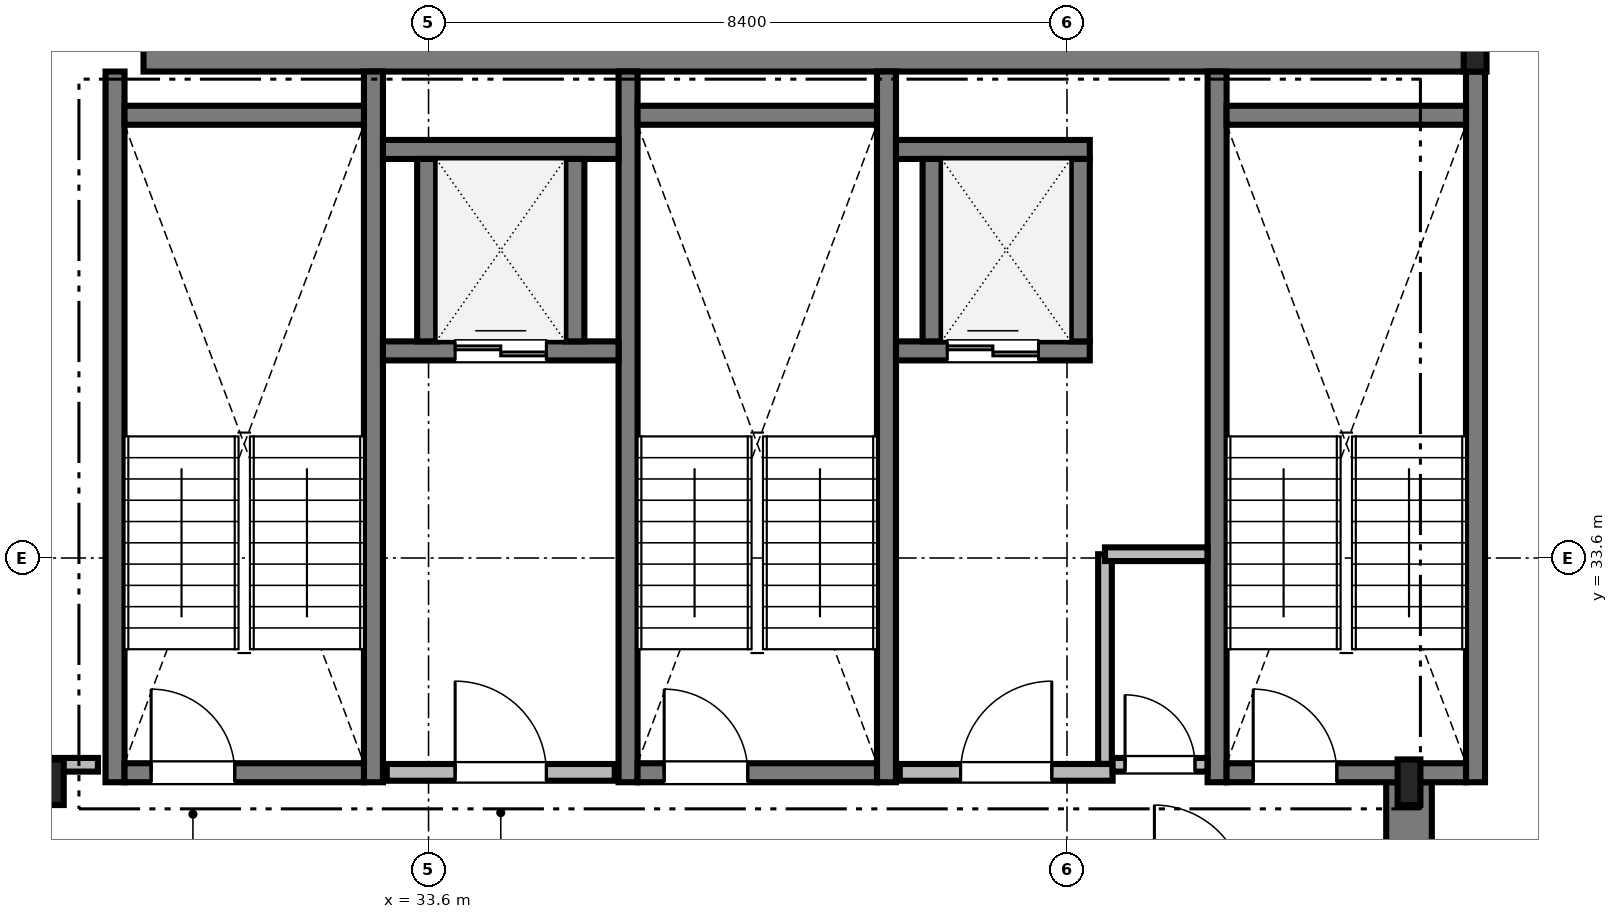
"""IFC4 building model, lengths in metres.
Left out: names, types, materials, properties, quantities, classifications, styles, units other than length and angle.
Written with IfcOpenShell. Run it as: python <this file> out.ifc"""

import sys

from ifc_helpers import new_model, si_unit, direction, frame, frame_2d, origin, origin_2d, place, context, subcontext, project, spatial, rectangle, i_section, extrude, source, transform, mapped, element, fill, save


model = new_model("IFC4")
c1 = context("Model", 3, precision=1e-05, world=origin(), true_north=direction((0.0, 1.0)))
c2 = subcontext(c1, "Body", "Model", "MODEL_VIEW")
j1 = project(units=[si_unit("LENGTHUNIT", "METRE"), si_unit("PLANEANGLEUNIT", "RADIAN")], contexts=[c1])
p1 = place(None, origin())
s1 = spatial("IfcSite", under=j1, at=p1, CompositionType="ELEMENT")
p2 = place(p1, origin())
s2 = spatial("IfcBuilding", under=s1, at=p2, CompositionType="ELEMENT")
p3 = place(p2, frame((0.0, 0.0, 258.5)))
s3 = spatial("IfcBuildingStorey", under=s2, at=p3, CompositionType="ELEMENT", Elevation=258.5)
m1 = source(origin(), c2, "Body", "SweptSolid", [
    extrude(rectangle(XDim=17.52, YDim=0.6, at=frame_2d((8.76, 0.0))), origin(), (0.0, 0.0, 1.0), 3.65),
])
p4 = place(p3, frame((29.85, 40.3, 0.0), z_axis=(0.0, 0.0, 1.0), x_axis=(1.0, 0.0, 0.0)))
e1 = element("IfcWall", 1, at=p4, inside=s3, PredefinedType="SHEAR", context=c2, shape_type="MappedRepresentation", body=[
    mapped(m1, transform((0.0, 0.0, 0.0), scale=1.0)),
])
m2 = source(origin(), c2, "Body", "SweptSolid", [
    extrude(rectangle(XDim=13.15, YDim=0.6, at=frame_2d((6.575, 0.0))), origin(), (0.0, 0.0, 1.0), 3.65),
])
p5 = place(p3, frame((46.5, 17.5, 0.0), z_axis=(0.0, 0.0, 1.0), x_axis=(0.0, 1.0, 0.0)))
e2 = element("IfcWall", 2, at=p5, inside=s3, PredefinedType="SHEAR", context=c2, shape_type="MappedRepresentation", body=[
    mapped(m2, transform((0.0, 0.0, 0.0), scale=1.0)),
])
m3 = source(origin(), c2, "Body", "SweptSolid", [
    extrude(i_section(OverallWidth=0.3, OverallDepth=0.6, WebThickness=0.015, FlangeThickness=0.03, FilletRadius=0.027, at=origin_2d()), origin(), (0.0, 0.0, 1.0), 3.65),
])
for number, where, z_axis, x_axis in (
    (3, (28.65, 30.65, 0.0), (0.0, 0.0, 1.0), (1.0, 0.0, 0.0)),
    (4, (46.5, 30.65, 0.0), (0.0, 0.0, 1.0), (1.0, 0.0, 0.0)),
    (5, (47.37, 40.3, 0.0), (0.0, 0.0, 1.0), (1.0, 0.0, 0.0)),
):
    element("IfcColumn", number, at=place(p3, frame(where, z_axis=z_axis, x_axis=x_axis)), inside=s3, PredefinedType="COLUMN", context=c2, shape_type="MappedRepresentation", body=[
        mapped(m3, transform((0.0, 0.0, 0.0), scale=1.0)),
    ])
m4 = source(origin(), c2, "Body", "SweptSolid", [
    extrude(rectangle(XDim=9.35, YDim=0.25, at=frame_2d((4.675, 0.0))), origin(), (0.0, 0.0, 1.0), 3.75),
])
for number, where, z_axis, x_axis in (
    (6, (29.475, 30.65, 0.0), (0.0, 0.0, 1.0), (0.0, 1.0, 0.0)),
    (7, (32.875, 30.65, 0.0), (0.0, 0.0, 1.0), (0.0, 1.0, 0.0)),
):
    element("IfcWall", number, at=place(p3, frame(where, z_axis=z_axis, x_axis=x_axis)), inside=s3, PredefinedType="SOLIDWALL", context=c2, shape_type="MappedRepresentation", body=[
        mapped(m4, transform((0.0, 0.0, 0.0), scale=1.0)),
    ])
m5 = source(origin(), c2, "Body", "SweptSolid", [
    extrude(rectangle(XDim=3.15, YDim=0.25, at=frame_2d((1.575, 0.0))), origin(), (0.0, 0.0, 1.0), 3.75),
])
p6 = place(p3, frame((29.6, 39.425, 0.0), z_axis=(0.0, 0.0, 1.0), x_axis=(1.0, 0.0, 0.0)))
e8 = element("IfcWall", 8, at=p6, inside=s3, PredefinedType="SOLIDWALL", context=c2, shape_type="MappedRepresentation", body=[
    mapped(m5, transform((0.0, 0.0, 0.0), scale=1.0)),
])
p7 = place(p3, frame((29.6, 30.775, 0.0), z_axis=(0.0, 0.0, 1.0), x_axis=(1.0, 0.0, 0.0)))
e9 = element("IfcWall", 9, at=p7, inside=s3, PredefinedType="SOLIDWALL", context=c2, shape_type="MappedRepresentation", body=[
    mapped(m5, transform((0.0, 0.0, 0.0), scale=1.0)),
])
m6 = source(origin(), c2, "Body", "SweptSolid", [
    extrude(rectangle(XDim=1.1, YDim=2.2, at=frame_2d((0.55, 1.1))), frame((0.0, 0.135, 0.0), z_axis=(0.0, -1.0, 0.0), x_axis=(1.0, 0.0, 0.0)), (0.0, 0.0, 1.0), 0.27),
])
p8 = place(p7, frame((0.35, 0.0, 0.0)))
e10 = element("IfcOpeningElement", 10, at=p8, cuts=e9, PredefinedType="OPENING", context=c2, shape_type="MappedRepresentation", body=[
    mapped(m6, transform((0.0, 0.0, 0.0), scale=1.0)),
])
for number, where, z_axis, x_axis in (
    (11, (36.225, 30.65, 0.0), (0.0, 0.0, 1.0), (0.0, 1.0, 0.0)),
    (12, (39.625, 30.65, 0.0), (0.0, 0.0, 1.0), (0.0, 1.0, 0.0)),
):
    element("IfcWall", number, at=place(p3, frame(where, z_axis=z_axis, x_axis=x_axis)), inside=s3, PredefinedType="SOLIDWALL", context=c2, shape_type="MappedRepresentation", body=[
        mapped(m4, transform((0.0, 0.0, 0.0), scale=1.0)),
    ])
p9 = place(p3, frame((36.35, 39.425, 0.0), z_axis=(0.0, 0.0, 1.0), x_axis=(1.0, 0.0, 0.0)))
e13 = element("IfcWall", 13, at=p9, inside=s3, PredefinedType="SOLIDWALL", context=c2, shape_type="MappedRepresentation", body=[
    mapped(m5, transform((0.0, 0.0, 0.0), scale=1.0)),
])
p10 = place(p3, frame((36.35, 30.775, 0.0), z_axis=(0.0, 0.0, 1.0), x_axis=(1.0, 0.0, 0.0)))
e14 = element("IfcWall", 14, at=p10, inside=s3, PredefinedType="SOLIDWALL", context=c2, shape_type="MappedRepresentation", body=[
    mapped(m5, transform((0.0, 0.0, 0.0), scale=1.0)),
])
p11 = place(p10, frame((0.35, 0.0, 0.0)))
e15 = element("IfcOpeningElement", 15, at=p11, cuts=e14, PredefinedType="OPENING", context=c2, shape_type="MappedRepresentation", body=[
    mapped(m6, transform((0.0, 0.0, 0.0), scale=1.0)),
])
for number, where, z_axis, x_axis in (
    (16, (43.975, 30.65, 0.0), (0.0, 0.0, 1.0), (0.0, 1.0, 0.0)),
    (17, (47.375, 30.65, 0.0), (0.0, 0.0, 1.0), (0.0, 1.0, 0.0)),
):
    element("IfcWall", number, at=place(p3, frame(where, z_axis=z_axis, x_axis=x_axis)), inside=s3, PredefinedType="SOLIDWALL", context=c2, shape_type="MappedRepresentation", body=[
        mapped(m4, transform((0.0, 0.0, 0.0), scale=1.0)),
    ])
p12 = place(p3, frame((44.1, 39.425, 0.0), z_axis=(0.0, 0.0, 1.0), x_axis=(1.0, 0.0, 0.0)))
e18 = element("IfcWall", 18, at=p12, inside=s3, PredefinedType="SOLIDWALL", context=c2, shape_type="MappedRepresentation", body=[
    mapped(m5, transform((0.0, 0.0, 0.0), scale=1.0)),
])
p13 = place(p3, frame((44.1, 30.775, 0.0), z_axis=(0.0, 0.0, 1.0), x_axis=(1.0, 0.0, 0.0)))
e19 = element("IfcWall", 19, at=p13, inside=s3, PredefinedType="SOLIDWALL", context=c2, shape_type="MappedRepresentation", body=[
    mapped(m5, transform((0.0, 0.0, 0.0), scale=1.0)),
])
p14 = place(p13, frame((0.35, 0.0, 0.0)))
e20 = element("IfcOpeningElement", 20, at=p14, cuts=e19, PredefinedType="OPENING", context=c2, shape_type="MappedRepresentation", body=[
    mapped(m6, transform((0.0, 0.0, 0.0), scale=1.0)),
])
m7 = source(origin(), c2, "Body", "SweptSolid", [
    extrude(rectangle(XDim=3.0, YDim=0.22, at=frame_2d((1.5, 0.0))), origin(), (0.0, 0.0, 1.0), 3.65),
])
p15 = place(p3, frame((33.05, 30.78, 0.0), z_axis=(0.0, 0.0, 1.0), x_axis=(1.0, 0.0, 0.0)))
e21 = element("IfcWall", 21, at=p15, inside=s3, PredefinedType="SOLIDWALL", context=c2, shape_type="MappedRepresentation", body=[
    mapped(m7, transform((0.0, 0.0, 0.0), scale=1.0)),
])
m8 = source(origin(), c2, "Body", "SweptSolid", [
    extrude(rectangle(XDim=1.2, YDim=2.2, at=frame_2d((0.6, 1.1))), frame((0.0, 0.12, 0.0), z_axis=(0.0, -1.0, 0.0), x_axis=(1.0, 0.0, 0.0)), (0.0, 0.0, 1.0), 0.24),
])
p16 = place(p15, frame((0.9, 0.0, 0.0)))
e22 = element("IfcOpeningElement", 22, at=p16, cuts=e21, PredefinedType="OPENING", context=c2, shape_type="MappedRepresentation", body=[
    mapped(m8, transform((0.0, 0.0, 0.0), scale=1.0)),
])
m9 = source(origin(), c2, "Body", "SweptSolid", [
    extrude(rectangle(XDim=2.8, YDim=0.22, at=frame_2d((1.4, 0.0))), origin(), (0.0, 0.0, 1.0), 3.65),
])
p17 = place(p3, frame((39.8, 30.78, 0.0), z_axis=(0.0, 0.0, 1.0), x_axis=(1.0, 0.0, 0.0)))
e23 = element("IfcWall", 23, at=p17, inside=s3, PredefinedType="SOLIDWALL", context=c2, shape_type="MappedRepresentation", body=[
    mapped(m9, transform((0.0, 0.0, 0.0), scale=1.0)),
])
p18 = place(p17, frame((0.8, 0.0, 0.0)))
e24 = element("IfcOpeningElement", 24, at=p18, cuts=e23, PredefinedType="OPENING", context=c2, shape_type="MappedRepresentation", body=[
    mapped(m8, transform((0.0, 0.0, 0.0), scale=1.0)),
])
m10 = source(origin(), c2, "Body", "SweptSolid", [
    extrude(rectangle(XDim=3.1, YDim=0.25, at=frame_2d((1.55, 0.0))), origin(), (0.0, 0.0, 1.0), 3.65),
])
p19 = place(p3, frame((33.0, 36.325, 0.0), z_axis=(0.0, 0.0, 1.0), x_axis=(1.0, 0.0, 0.0)))
e25 = element("IfcWall", 25, at=p19, inside=s3, PredefinedType="SOLIDWALL", context=c2, shape_type="MappedRepresentation", body=[
    mapped(m10, transform((0.0, 0.0, 0.0), scale=1.0)),
])
m11 = source(origin(), c2, "Body", "SweptSolid", [
    extrude(rectangle(XDim=1.2, YDim=2.25, at=frame_2d((0.6, 1.125))), frame((0.0, 0.135, 0.0), z_axis=(0.0, -1.0, 0.0), x_axis=(1.0, 0.0, 0.0)), (0.0, 0.0, 1.0), 0.27),
])
p20 = place(p19, frame((0.95, 0.0, 0.0)))
e26 = element("IfcOpeningElement", 26, at=p20, cuts=e25, PredefinedType="OPENING", context=c2, shape_type="MappedRepresentation", body=[
    mapped(m11, transform((0.0, 0.0, 0.0), scale=1.0)),
])
p21 = place(p3, frame((33.0, 38.975, 0.0), z_axis=(0.0, 0.0, 1.0), x_axis=(1.0, 0.0, 0.0)))
e27 = element("IfcWall", 27, at=p21, inside=s3, PredefinedType="SOLIDWALL", context=c2, shape_type="MappedRepresentation", body=[
    mapped(m10, transform((0.0, 0.0, 0.0), scale=1.0)),
])
m12 = source(origin(), c2, "Body", "SweptSolid", [
    extrude(rectangle(XDim=2.4, YDim=0.25, at=frame_2d((1.2, 0.0))), origin(), (0.0, 0.0, 1.0), 3.65),
])
for number, where, z_axis, x_axis in (
    (28, (33.575, 36.45, 0.0), (0.0, 0.0, 1.0), (0.0, 1.0, 0.0)),
    (29, (35.525, 36.45, 0.0), (0.0, 0.0, 1.0), (0.0, 1.0, 0.0)),
):
    element("IfcWall", number, at=place(p3, frame(where, z_axis=z_axis, x_axis=x_axis)), inside=s3, PredefinedType="SOLIDWALL", context=c2, shape_type="MappedRepresentation", body=[
        mapped(m12, transform((0.0, 0.0, 0.0), scale=1.0)),
    ])
m13 = source(origin(), c2, "Body", "SweptSolid", [
    extrude(rectangle(XDim=2.55, YDim=0.25, at=frame_2d((1.275, 0.0))), origin(), (0.0, 0.0, 1.0), 3.65),
])
p22 = place(p3, frame((39.75, 36.325, 0.0), z_axis=(0.0, 0.0, 1.0), x_axis=(1.0, 0.0, 0.0)))
e30 = element("IfcWall", 30, at=p22, inside=s3, PredefinedType="SOLIDWALL", context=c2, shape_type="MappedRepresentation", body=[
    mapped(m13, transform((0.0, 0.0, 0.0), scale=1.0)),
])
p23 = place(p22, frame((0.675, 0.0, 0.0)))
e31 = element("IfcOpeningElement", 31, at=p23, cuts=e30, PredefinedType="OPENING", context=c2, shape_type="MappedRepresentation", body=[
    mapped(m11, transform((0.0, 0.0, 0.0), scale=1.0)),
])
p24 = place(p3, frame((39.75, 38.975, 0.0), z_axis=(0.0, 0.0, 1.0), x_axis=(1.0, 0.0, 0.0)))
e32 = element("IfcWall", 32, at=p24, inside=s3, PredefinedType="SOLIDWALL", context=c2, shape_type="MappedRepresentation", body=[
    mapped(m13, transform((0.0, 0.0, 0.0), scale=1.0)),
])
for number, where, z_axis, x_axis in (
    (33, (40.225, 36.45, 0.0), (0.0, 0.0, 1.0), (0.0, 1.0, 0.0)),
    (34, (42.175, 36.45, 0.0), (0.0, 0.0, 1.0), (0.0, 1.0, 0.0)),
):
    element("IfcWall", number, at=place(p3, frame(where, z_axis=z_axis, x_axis=x_axis)), inside=s3, PredefinedType="SOLIDWALL", context=c2, shape_type="MappedRepresentation", body=[
        mapped(m12, transform((0.0, 0.0, 0.0), scale=1.0)),
    ])
m14 = source(origin(), c2, "Body", "SweptSolid", [
    extrude(rectangle(XDim=12.788, YDim=0.18, at=frame_2d((6.394, 0.0))), origin(), (0.0, 0.0, 1.0), 2.892),
])
p25 = place(p3, frame((16.462, 30.88, 0.0), z_axis=(0.0, 0.0, 1.0), x_axis=(1.0, 0.0, 0.0)))
e35 = element("IfcWall", 35, at=p25, inside=s3, PredefinedType="PARTITIONING", context=c2, shape_type="MappedRepresentation", body=[
    mapped(m14, transform((0.0, 0.0, 0.0), scale=1.0)),
])
m15 = source(origin(), c2, "Body", "SweptSolid", [
    extrude(rectangle(XDim=1.05, YDim=2.2, at=frame_2d((0.525, 1.1))), frame((0.0, 0.1, 0.0), z_axis=(0.0, -1.0, 0.0), x_axis=(1.0, 0.0, 0.0)), (0.0, 0.0, 1.0), 0.2),
])
p26 = place(p25, frame((5.738, 0.0, 0.0)))
e36 = element("IfcOpeningElement", 36, at=p26, cuts=e35, PredefinedType="OPENING", context=c2, shape_type="MappedRepresentation", body=[
    mapped(m15, transform((0.0, 0.0, 0.0), scale=1.0)),
])
m16 = source(origin(), c2, "Body", "SweptSolid", [
    extrude(rectangle(XDim=1.248, YDim=0.18, at=frame_2d((0.624, 0.0))), origin(), (0.0, 0.0, 1.0), 3.65),
])
p27 = place(p3, frame((42.6, 30.88, 0.0), z_axis=(0.0, 0.0, 1.0), x_axis=(1.0, 0.0, 0.0)))
e37 = element("IfcWall", 37, at=p27, inside=s3, PredefinedType="PARTITIONING", context=c2, shape_type="MappedRepresentation", body=[
    mapped(m16, transform((0.0, 0.0, 0.0), scale=1.0)),
])
m17 = source(origin(), c2, "Body", "SweptSolid", [
    extrude(rectangle(XDim=0.92, YDim=2.1, at=frame_2d((0.46, 1.05))), frame((0.0, 0.1, 0.0), z_axis=(0.0, -1.0, 0.0), x_axis=(1.0, 0.0, 0.0)), (0.0, 0.0, 1.0), 0.2),
])
p28 = place(p27, frame((0.164, 0.0, 0.0)))
e38 = element("IfcOpeningElement", 38, at=p28, cuts=e37, PredefinedType="OPENING", context=c2, shape_type="MappedRepresentation", body=[
    mapped(m17, transform((0.0, 0.0, 0.0), scale=1.0)),
])
m18 = source(origin(), c2, "Body", "SweptSolid", [
    extrude(rectangle(XDim=2.758, YDim=0.18, at=frame_2d((1.379, 0.0))), origin(), (0.0, 0.0, 1.0), 3.65),
])
p29 = place(p3, frame((42.5, 30.892, 0.0), z_axis=(0.0, 0.0, 1.0), x_axis=(0.0, 1.0, 0.0)))
e39 = element("IfcWall", 39, at=p29, inside=s3, PredefinedType="PARTITIONING", context=c2, shape_type="MappedRepresentation", body=[
    mapped(m18, transform((0.0, 0.0, 0.0), scale=1.0)),
])
m19 = source(origin(), c2, "Body", "SweptSolid", [
    extrude(rectangle(XDim=1.348, YDim=0.18, at=frame_2d((0.674, 0.0))), origin(), (0.0, 0.0, 1.0), 3.65),
])
p30 = place(p3, frame((42.5, 33.65, 0.0), z_axis=(0.0, 0.0, 1.0), x_axis=(1.0, 0.0, 0.0)))
e40 = element("IfcWall", 40, at=p30, inside=s3, PredefinedType="PARTITIONING", context=c2, shape_type="MappedRepresentation", body=[
    mapped(m19, transform((0.0, 0.0, 0.0), scale=1.0)),
])
m20 = source(origin(), c2, "Body", "SweptSolid", [
    extrude(rectangle(XDim=1.1, YDim=2.2, at=frame_2d((0.55, 1.1))), frame((0.0, 0.025, 0.0), z_axis=(0.0, -1.0, 0.0), x_axis=(1.0, 0.0, 0.0)), (0.0, 0.0, 1.0), 0.05),
])
p31 = place(p8, origin())
e41 = element("IfcDoor", 41, at=p31, inside=s3, OperationType="SINGLE_SWING_LEFT", PredefinedType="DOOR", context=c2, shape_type="MappedRepresentation", body=[
    mapped(m20, transform((0.0, 0.0, 0.0), scale=1.0)),
])
fill(e10, e41)
p32 = place(p11, origin())
e42 = element("IfcDoor", 42, at=p32, inside=s3, OperationType="SINGLE_SWING_LEFT", PredefinedType="DOOR", context=c2, shape_type="MappedRepresentation", body=[
    mapped(m20, transform((0.0, 0.0, 0.0), scale=1.0)),
])
fill(e15, e42)
p33 = place(p14, origin())
e43 = element("IfcDoor", 43, at=p33, inside=s3, OperationType="SINGLE_SWING_LEFT", PredefinedType="DOOR", context=c2, shape_type="MappedRepresentation", body=[
    mapped(m20, transform((0.0, 0.0, 0.0), scale=1.0)),
])
fill(e20, e43)
m21 = source(origin(), c2, "Body", "SweptSolid", [
    extrude(rectangle(XDim=1.2, YDim=2.2, at=frame_2d((0.6, 1.1))), frame((0.0, 0.025, 0.0), z_axis=(0.0, -1.0, 0.0), x_axis=(1.0, 0.0, 0.0)), (0.0, 0.0, 1.0), 0.05),
])
p34 = place(p16, origin())
e44 = element("IfcDoor", 44, at=p34, inside=s3, OperationType="SINGLE_SWING_LEFT", PredefinedType="DOOR", context=c2, shape_type="MappedRepresentation", body=[
    mapped(m21, transform((0.0, 0.0, 0.0), scale=1.0)),
])
fill(e22, e44)
p35 = place(p18, origin())
e45 = element("IfcDoor", 45, at=p35, inside=s3, OperationType="SINGLE_SWING_RIGHT", PredefinedType="DOOR", context=c2, shape_type="MappedRepresentation", body=[
    mapped(m21, transform((0.0, 0.0, 0.0), scale=1.0)),
])
fill(e24, e45)
m22 = source(origin(), c2, "Body", "SweptSolid", [
    extrude(rectangle(XDim=1.2, YDim=2.25, at=frame_2d((0.6, 1.125))), frame((0.0, 0.025, 0.0), z_axis=(0.0, -1.0, 0.0), x_axis=(1.0, 0.0, 0.0)), (0.0, 0.0, 1.0), 0.05),
])
p36 = place(p20, origin())
e46 = element("IfcDoor", 46, at=p36, inside=s3, OperationType="DOUBLE_DOOR_SLIDING", PredefinedType="DOOR", context=c2, shape_type="MappedRepresentation", body=[
    mapped(m22, transform((0.0, 0.0, 0.0), scale=1.0)),
])
fill(e26, e46)
p37 = place(p23, origin())
e47 = element("IfcDoor", 47, at=p37, inside=s3, OperationType="DOUBLE_DOOR_SLIDING", PredefinedType="DOOR", context=c2, shape_type="MappedRepresentation", body=[
    mapped(m22, transform((0.0, 0.0, 0.0), scale=1.0)),
])
fill(e31, e47)
m23 = source(origin(), c2, "Body", "SweptSolid", [
    extrude(rectangle(XDim=0.92, YDim=2.1, at=frame_2d((0.46, 1.05))), frame((0.0, 0.025, 0.0), z_axis=(0.0, -1.0, 0.0), x_axis=(1.0, 0.0, 0.0)), (0.0, 0.0, 1.0), 0.05),
])
p38 = place(p28, origin())
e48 = element("IfcDoor", 48, at=p38, inside=s3, OperationType="SINGLE_SWING_LEFT", PredefinedType="DOOR", context=c2, shape_type="MappedRepresentation", body=[
    mapped(m23, transform((0.0, 0.0, 0.0), scale=1.0)),
])
fill(e38, e48)
save(model, sys.argv[1])
